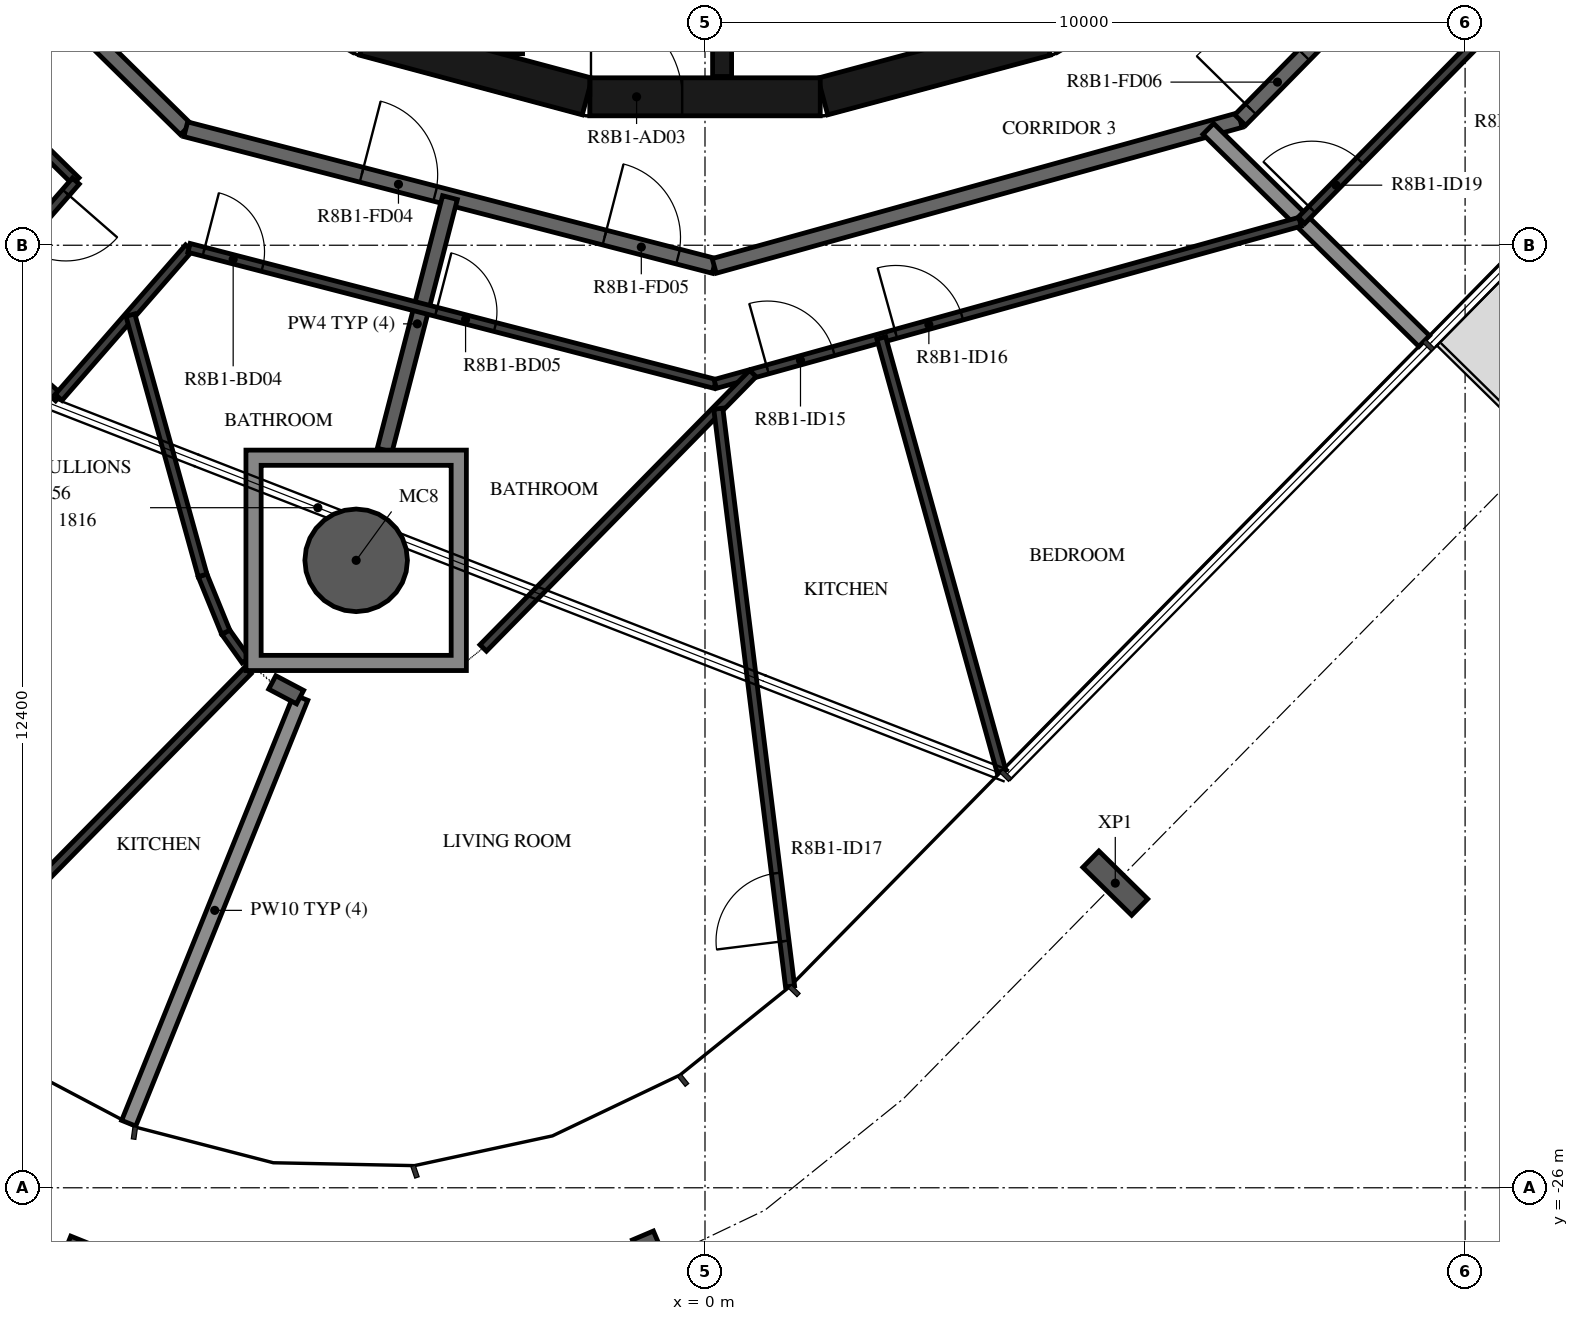
"""IFC4 building model, lengths in metres.
Left out: names, types, materials, properties, quantities, classifications, styles, units other than length and angle.
Written with IfcOpenShell. Run it as: python <this file> out.ifc"""

import sys

from ifc_helpers import new_model, si_unit, direction, frame, frame_2d, origin, origin_2d, place, context, subcontext, project, spatial, polyline, rectangle, hollow_circle, i_section, outline, extrude, element, fill, save


model = new_model("IFC4")
c1 = context("Model", 3, precision=1e-05, world=origin(), true_north=direction((0.0, 1.0)))
c2 = subcontext(c1, "Body", "Model", "MODEL_VIEW")
j1 = project(units=[si_unit("LENGTHUNIT", "METRE"), si_unit("PLANEANGLEUNIT", "RADIAN")], contexts=[c1])
p1 = place(None, origin())
s1 = spatial("IfcSite", under=j1, at=p1, CompositionType="ELEMENT")
p2 = place(p1, origin())
s2 = spatial("IfcBuilding", under=s1, at=p2, CompositionType="ELEMENT")
p3 = place(p2, frame((0.0, 0.0, 308.7)))
s3 = spatial("IfcBuildingStorey", under=s2, at=p3, CompositionType="ELEMENT", Elevation=308.7)
p4 = place(p3, frame((-4.589, -17.745, -0.38), z_axis=(0.0, 0.0, 1.0), x_axis=(1.0, 0.0, 0.0)))
e1 = element("IfcColumn", 1, at=p4, inside=s3, PredefinedType="COLUMN", context=c2, shape_type="SweptSolid", body=[
    extrude(hollow_circle(Radius=0.675, WallThickness=0.03, at=origin_2d()), origin(), (0.0, 0.0, 1.0), 3.5),
])
for number, where, z_axis, x_axis in (
    (2, (-8.373, -27.11, -0.38), (0.0, 0.0, 1.0), (-0.927, 0.375, 0.0)),
    (3, (-0.641, -27.042, -0.38), (0.0, 0.0, 1.0), (-0.92, -0.391, 0.0)),
    (4, (5.398, -21.992, -0.38), (0.0, 0.0, 1.0), (-0.701, -0.713, 0.0)),
):
    element("IfcColumn", number, at=place(p3, frame(where, z_axis=z_axis, x_axis=x_axis)), inside=s3, PredefinedType="COLUMN", context=c2, shape_type="SweptSolid", body=[
        extrude(i_section(OverallWidth=0.3, OverallDepth=0.9, WebThickness=0.019, FlangeThickness=0.035, FilletRadius=0.03, at=origin_2d()), origin(), (0.0, 0.0, 1.0), 3.5),
    ])
for number, where, z_axis, x_axis in (
    (5, (1.55, -11.643, 0.0), (0.0, 0.0, 1.0), (0.966, 0.259, 0.0)),
    (6, (-4.479, -10.858, 0.0), (0.0, 0.0, 1.0), (0.966, -0.259, 0.0)),
):
    element("IfcWall", number, at=place(p3, frame(where, z_axis=z_axis, x_axis=x_axis)), inside=s3, PredefinedType="SHEAR", context=c2, shape_type="SweptSolid", body=[
        extrude(rectangle(XDim=3.033, YDim=0.5, at=frame_2d((1.516, 0.0))), origin(), (0.0, 0.0, 1.0), 3.12),
    ])
p5 = place(p3, frame((-1.516, -11.647, 0.0), z_axis=(0.0, 0.0, 1.0), x_axis=(1.0, 0.0, 0.0)))
e7 = element("IfcWall", 7, at=p5, inside=s3, PredefinedType="SHEAR", context=c2, shape_type="SweptSolid", body=[
    extrude(rectangle(XDim=3.033, YDim=0.5, at=frame_2d((1.516, 0.0))), origin(), (0.0, 0.0, 1.0), 3.12),
])
p6 = place(p5, frame((0.016, 0.0, 0.0)))
e8 = element("IfcOpeningElement", 8, at=p6, cuts=e7, PredefinedType="OPENING", context=c2, shape_type="SweptSolid", body=[
    extrude(rectangle(XDim=1.2, YDim=2.1, at=frame_2d((0.6, 1.05))), frame((0.0, 0.26, 0.0), z_axis=(0.0, -1.0, 0.0), x_axis=(1.0, 0.0, 0.0)), (0.0, 0.0, 1.0), 0.52),
])
p7 = place(p3, frame((-2.525, -8.97, 0.0), z_axis=(0.0, 0.0, 1.0), x_axis=(0.0, -1.0, 0.0)))
e9 = element("IfcWall", 9, at=p7, inside=s3, PredefinedType="SHEAR", context=c2, shape_type="SweptSolid", body=[
    extrude(rectangle(XDim=2.11, YDim=0.25, at=frame_2d((1.055, 0.0))), origin(), (0.0, 0.0, 1.0), 3.12),
])
p8 = place(p3, frame((0.225, -8.97, 0.0), z_axis=(0.0, 0.0, 1.0), x_axis=(0.0, -1.0, 0.0)))
e10 = element("IfcWall", 10, at=p8, inside=s3, PredefinedType="SHEAR", context=c2, shape_type="SweptSolid", body=[
    extrude(rectangle(XDim=2.41, YDim=0.25, at=frame_2d((1.205, 0.0))), origin(), (0.0, 0.0, 1.0), 3.12),
])
p9 = place(p3, frame((-11.953, -7.041, 0.0), z_axis=(0.0, 0.0, 1.0), x_axis=(0.713250549143, -0.70090916255, 0.0)))
e11 = element("IfcWall", 11, at=p9, inside=s3, PredefinedType="STANDARD", context=c2, shape_type="SweptSolid", body=[
    extrude(rectangle(XDim=7.181, YDim=0.2, at=frame_2d((3.59, 0.0))), origin(), (0.0, 0.0, 1.0), 3.12),
])
p10 = place(p3, frame((-6.831, -12.074, 0.0), z_axis=(0.0, 0.0, 1.0), x_axis=(0.968144780225, -0.250391063186, 0.0)))
e12 = element("IfcWall", 12, at=p10, inside=s3, PredefinedType="STANDARD", context=c2, shape_type="SweptSolid", body=[
    extrude(rectangle(XDim=7.181, YDim=0.2, at=frame_2d((3.591, 0.0))), origin(), (0.0, 0.0, 1.0), 3.12),
])
p11 = place(p10, frame((2.39, 0.0, 0.0)))
e13 = element("IfcOpeningElement", 13, at=p11, cuts=e12, PredefinedType="OPENING", context=c2, shape_type="SweptSolid", body=[
    extrude(rectangle(XDim=1.0, YDim=2.1, at=frame_2d((0.5, 1.05))), frame((0.0, 0.11, 0.0), z_axis=(0.0, -1.0, 0.0), x_axis=(1.0, 0.0, 0.0)), (0.0, 0.0, 1.0), 0.22),
])
p12 = place(p10, frame((5.69, 0.0, 0.0)))
e14 = element("IfcOpeningElement", 14, at=p12, cuts=e12, PredefinedType="OPENING", context=c2, shape_type="SweptSolid", body=[
    extrude(rectangle(XDim=1.0, YDim=2.1, at=frame_2d((0.5, 1.05))), frame((0.0, 0.11, 0.0), z_axis=(0.0, -1.0, 0.0), x_axis=(1.0, 0.0, 0.0)), (0.0, 0.0, 1.0), 0.22),
])
p13 = place(p3, frame((0.121, -13.872, 0.0), z_axis=(0.0, 0.0, 1.0), x_axis=(0.963625960674, 0.267254575108, 0.0)))
e15 = element("IfcWall", 15, at=p13, inside=s3, PredefinedType="STANDARD", context=c2, shape_type="SweptSolid", body=[
    extrude(rectangle(XDim=7.181, YDim=0.2, at=frame_2d((3.591, 0.0))), origin(), (0.0, 0.0, 1.0), 3.12),
])
p14 = place(p3, frame((7.041, -11.953, 0.0), z_axis=(0.0, 0.0, 1.0), x_axis=(0.70090916255, 0.713250549143, 0.0)))
e16 = element("IfcWall", 16, at=p14, inside=s3, PredefinedType="STANDARD", context=c2, shape_type="SweptSolid", body=[
    extrude(rectangle(XDim=7.181, YDim=0.2, at=frame_2d((3.59, 0.0))), origin(), (0.0, 0.0, 1.0), 3.12),
])
p15 = place(p14, frame((0.2, 0.0, 0.0)))
e17 = element("IfcOpeningElement", 17, at=p15, cuts=e16, PredefinedType="OPENING", context=c2, shape_type="SweptSolid", body=[
    extrude(rectangle(XDim=1.0, YDim=2.1, at=frame_2d((0.5, 1.05))), frame((0.0, 0.11, 0.0), z_axis=(0.0, -1.0, 0.0), x_axis=(1.0, 0.0, 0.0)), (0.0, 0.0, 1.0), 0.22),
])
p16 = place(p3, frame((-4.214, -16.295, 0.0), z_axis=(0.0, 0.0, 1.0), x_axis=(0.250428810918, 0.968135016752, 0.0)))
e18 = element("IfcWall", 18, at=p16, inside=s3, PredefinedType="STANDARD", context=c2, shape_type="SweptSolid", body=[
    extrude(rectangle(XDim=3.432, YDim=0.2, at=frame_2d((1.716, 0.0))), origin(), (0.0, 0.0, 1.0), 3.12),
])
p17 = place(p3, frame((-7.582, -25.151, 0.0), z_axis=(0.0, 0.0, 1.0), x_axis=(0.3746561435, 0.927163833493, 0.0)))
e19 = element("IfcWall", 19, at=p17, inside=s3, PredefinedType="STANDARD", context=c2, shape_type="SweptSolid", body=[
    extrude(rectangle(XDim=6.041, YDim=0.2, at=frame_2d((3.021, 0.0))), origin(), (0.0, 0.0, 1.0), 2.73),
])
p18 = place(p3, frame((-5.327, -19.545, 0.0), z_axis=(0.0, 0.0, 1.0), x_axis=(-0.884418577045, 0.466694525979, 0.0)))
e20 = element("IfcWall", 20, at=p18, inside=s3, PredefinedType="STANDARD", context=c2, shape_type="SweptSolid", body=[
    extrude(rectangle(XDim=0.414, YDim=0.2, at=frame_2d((0.207, 0.0))), origin(), (0.0, 0.0, 1.0), 3.12),
])
p19 = place(p3, frame((9.462, -14.861, 0.0), z_axis=(0.0, 0.0, 1.0), x_axis=(-0.713302018318, 0.700856783276, 0.0)))
e21 = element("IfcWall", 21, at=p19, inside=s3, PredefinedType="STANDARD", context=c2, shape_type="SweptSolid", body=[
    extrude(rectangle(XDim=3.982, YDim=0.2, at=frame_2d((1.991, 0.0))), origin(), (0.0, 0.0, 1.0), 2.73),
])
p20 = place(p3, frame((-13.291, -7.829, 0.0), z_axis=(0.0, 0.0, 1.0), x_axis=(0.71326209988, -0.700897408238, 0.0)))
e22 = element("IfcWall", 22, at=p20, inside=s3, PredefinedType="PARTITIONING", context=c2, shape_type="SweptSolid", body=[
    extrude(rectangle(XDim=7.029, YDim=0.12, at=frame_2d((3.515, 0.0))), origin(), (0.0, 0.0, 1.0), 3.12),
])
p21 = place(p3, frame((-8.278, -12.756, 0.0), z_axis=(0.0, 0.0, 1.0), x_axis=(-0.657358463875, -0.753578031774, 0.0)))
e23 = element("IfcWall", 23, at=p21, inside=s3, PredefinedType="PARTITIONING", context=c2, shape_type="SweptSolid", body=[
    extrude(rectangle(XDim=2.294, YDim=0.12, at=frame_2d((1.147, 0.0))), origin(), (0.0, 0.0, 1.0), 3.12),
])
p22 = place(p21, frame((0.2, 0.0, 0.0)))
e24 = element("IfcOpeningElement", 24, at=p22, cuts=e23, PredefinedType="OPENING", context=c2, shape_type="SweptSolid", body=[
    extrude(rectangle(XDim=0.9, YDim=2.1, at=frame_2d((0.45, 1.05))), frame((0.0, 0.07, 0.0), z_axis=(0.0, -1.0, 0.0), x_axis=(1.0, 0.0, 0.0)), (0.0, 0.0, 1.0), 0.14),
])
p23 = place(p3, frame((-9.785, -14.484, 0.0), z_axis=(0.0, 0.0, 1.0), x_axis=(0.753643217927, -0.657283728745, 0.0)))
e25 = element("IfcWall", 25, at=p23, inside=s3, PredefinedType="PARTITIONING", context=c2, shape_type="SweptSolid", body=[
    extrude(rectangle(XDim=1.7, YDim=0.12, at=frame_2d((0.85, 0.0))), origin(), (0.0, 0.0, 1.0), 3.12),
])
p24 = place(p3, frame((-8.504, -15.602, 0.0), z_axis=(0.0, 0.0, 1.0), x_axis=(0.657298689015, 0.753630170189, 0.0)))
e26 = element("IfcWall", 26, at=p24, inside=s3, PredefinedType="PARTITIONING", context=c2, shape_type="SweptSolid", body=[
    extrude(rectangle(XDim=2.61, YDim=0.12, at=frame_2d((1.305, 0.0))), origin(), (0.0, 0.0, 1.0), 3.12),
])
p25 = place(p3, frame((-6.788, -13.635, 0.0), z_axis=(0.0, 0.0, 1.0), x_axis=(0.968142345176, -0.250400478189, 0.0)))
e27 = element("IfcWall", 27, at=p25, inside=s3, PredefinedType="PARTITIONING", context=c2, shape_type="SweptSolid", body=[
    extrude(rectangle(XDim=7.151, YDim=0.12, at=frame_2d((3.575, 0.0))), origin(), (0.0, 0.0, 1.0), 3.12),
])
p26 = place(p25, frame((0.2, 0.0, 0.0)))
e28 = element("IfcOpeningElement", 28, at=p26, cuts=e27, PredefinedType="OPENING", context=c2, shape_type="SweptSolid", body=[
    extrude(rectangle(XDim=0.8, YDim=2.1, at=frame_2d((0.4, 1.05))), frame((0.0, 0.07, 0.0), z_axis=(0.0, -1.0, 0.0), x_axis=(1.0, 0.0, 0.0)), (0.0, 0.0, 1.0), 0.14),
])
p27 = place(p25, frame((3.358, 0.0, 0.0)))
e29 = element("IfcOpeningElement", 29, at=p27, cuts=e27, PredefinedType="OPENING", context=c2, shape_type="SweptSolid", body=[
    extrude(rectangle(XDim=0.8, YDim=2.1, at=frame_2d((0.4, 1.05))), frame((0.0, 0.07, 0.0), z_axis=(0.0, -1.0, 0.0), x_axis=(1.0, 0.0, 0.0)), (0.0, 0.0, 1.0), 0.14),
])
p28 = place(p3, frame((-6.042, -19.061, 0.0), z_axis=(0.0, 0.0, 1.0), x_axis=(-0.580679627377, 0.814132157791, 0.0)))
e30 = element("IfcWall", 30, at=p28, inside=s3, PredefinedType="PARTITIONING", context=c2, shape_type="SweptSolid", body=[
    extrude(rectangle(XDim=0.455, YDim=0.12, at=frame_2d((0.228, 0.0))), origin(), (0.0, 0.0, 1.0), 3.12),
])
p29 = place(p3, frame((-6.306, -18.69, 0.0), z_axis=(0.0, 0.0, 1.0), x_axis=(-0.377123826076, 0.926162847347, 0.0)))
e31 = element("IfcWall", 31, at=p29, inside=s3, PredefinedType="PARTITIONING", context=c2, shape_type="SweptSolid", body=[
    extrude(rectangle(XDim=0.807, YDim=0.12, at=frame_2d((0.403, 0.0))), origin(), (0.0, 0.0, 1.0), 3.12),
])
p30 = place(p3, frame((-6.61, -17.943, 0.0), z_axis=(0.0, 0.0, 1.0), x_axis=(-0.267254066434, 0.96362610175, 0.0)))
e32 = element("IfcWall", 32, at=p30, inside=s3, PredefinedType="PARTITIONING", context=c2, shape_type="SweptSolid", body=[
    extrude(rectangle(XDim=3.553, YDim=0.12, at=frame_2d((1.777, 0.0))), origin(), (0.0, 0.0, 1.0), 3.12),
])
p31 = place(p3, frame((-10.169, -23.421, 0.0), z_axis=(0.0, 0.0, 1.0), x_axis=(0.70104569517, 0.713116353258, 0.0)))
e33 = element("IfcWall", 33, at=p31, inside=s3, PredefinedType="PARTITIONING", context=c2, shape_type="SweptSolid", body=[
    extrude(rectangle(XDim=5.926, YDim=0.12, at=frame_2d((2.963, 0.0))), origin(), (0.0, 0.0, 1.0), 3.12),
])
p32 = place(p31, frame((0.2, 0.0, 0.0)))
e34 = element("IfcOpeningElement", 34, at=p32, cuts=e33, PredefinedType="OPENING", context=c2, shape_type="SweptSolid", body=[
    extrude(rectangle(XDim=0.9, YDim=2.1, at=frame_2d((0.45, 1.05))), frame((0.0, 0.07, 0.0), z_axis=(0.0, -1.0, 0.0), x_axis=(1.0, 0.0, 0.0)), (0.0, 0.0, 1.0), 0.14),
])
p33 = place(p3, frame((0.135, -15.425, 0.0), z_axis=(0.0, 0.0, 1.0), x_axis=(0.963633899075, 0.267225950373, 0.0)))
e35 = element("IfcWall", 35, at=p33, inside=s3, PredefinedType="PARTITIONING", context=c2, shape_type="SweptSolid", body=[
    extrude(rectangle(XDim=7.985, YDim=0.12, at=frame_2d((3.992, 0.0))), origin(), (0.0, 0.0, 1.0), 3.12),
])
p34 = place(p33, frame((0.714, 0.0, 0.0)))
e36 = element("IfcOpeningElement", 36, at=p34, cuts=e35, PredefinedType="OPENING", context=c2, shape_type="SweptSolid", body=[
    extrude(rectangle(XDim=0.9, YDim=2.1, at=frame_2d((0.45, 1.05))), frame((0.0, 0.07, 0.0), z_axis=(0.0, -1.0, 0.0), x_axis=(1.0, 0.0, 0.0)), (0.0, 0.0, 1.0), 0.14),
])
p35 = place(p33, frame((2.467, 0.0, 0.0)))
e37 = element("IfcOpeningElement", 37, at=p35, cuts=e35, PredefinedType="OPENING", context=c2, shape_type="SweptSolid", body=[
    extrude(rectangle(XDim=0.9, YDim=2.1, at=frame_2d((0.45, 1.05))), frame((0.0, 0.07, 0.0), z_axis=(0.0, -1.0, 0.0), x_axis=(1.0, 0.0, 0.0)), (0.0, 0.0, 1.0), 0.14),
])
p36 = place(p3, frame((-2.918, -18.898, 0.0), z_axis=(0.0, 0.0, 1.0), x_axis=(0.700881606707, 0.713277627141, 0.0)))
e38 = element("IfcWall", 38, at=p36, inside=s3, PredefinedType="PARTITIONING", context=c2, shape_type="SweptSolid", body=[
    extrude(rectangle(XDim=5.062, YDim=0.12, at=frame_2d((2.531, 0.0))), origin(), (0.0, 0.0, 1.0), 3.12),
])
p37 = place(p3, frame((1.119, -23.35, 0.0), z_axis=(0.0, 0.0, 1.0), x_axis=(-0.123281341476, 0.992371760402, 0.0)))
e39 = element("IfcWall", 39, at=p37, inside=s3, PredefinedType="PARTITIONING", context=c2, shape_type="SweptSolid", body=[
    extrude(rectangle(XDim=7.658, YDim=0.12, at=frame_2d((3.829, 0.0))), origin(), (0.0, 0.0, 1.0), 3.12),
])
p38 = place(p37, frame((0.6, 0.0, 0.0)))
e40 = element("IfcOpeningElement", 40, at=p38, cuts=e39, PredefinedType="OPENING", context=c2, shape_type="SweptSolid", body=[
    extrude(rectangle(XDim=0.9, YDim=2.1, at=frame_2d((0.45, 1.05))), frame((0.0, 0.07, 0.0), z_axis=(0.0, -1.0, 0.0), x_axis=(1.0, 0.0, 0.0)), (0.0, 0.0, 1.0), 0.14),
])
p39 = place(p3, frame((3.9, -20.521, 0.0), z_axis=(0.0, 0.0, 1.0), x_axis=(-0.267235205115, 0.963631332589, 0.0)))
e41 = element("IfcWall", 41, at=p39, inside=s3, PredefinedType="PARTITIONING", context=c2, shape_type="SweptSolid", body=[
    extrude(rectangle(XDim=5.916, YDim=0.12, at=frame_2d((2.958, 0.0))), origin(), (0.0, 0.0, 1.0), 3.12),
])
p40 = place(p3, frame((7.846, -13.273, 0.0), z_axis=(0.0, 0.0, 1.0), x_axis=(0.700915117659, 0.713244697027, 0.0)))
e42 = element("IfcWall", 42, at=p40, inside=s3, PredefinedType="PARTITIONING", context=c2, shape_type="SweptSolid", body=[
    extrude(rectangle(XDim=7.96, YDim=0.12, at=frame_2d((3.98, 0.0))), origin(), (0.0, 0.0, 1.0), 3.12),
])
p41 = place(p40, frame((0.2, 0.0, 0.0)))
e43 = element("IfcOpeningElement", 43, at=p41, cuts=e42, PredefinedType="OPENING", context=c2, shape_type="SweptSolid", body=[
    extrude(rectangle(XDim=0.9, YDim=2.1, at=frame_2d((0.45, 1.05))), frame((0.0, 0.07, 0.0), z_axis=(0.0, -1.0, 0.0), x_axis=(1.0, 0.0, 0.0)), (0.0, 0.0, 1.0), 0.14),
])
p42 = place(p3, origin())
e44 = element("IfcWall", 44, at=p42, inside=s3, PredefinedType="STANDARD", context=c2, shape_type="SweptSolid", body=[
    extrude(outline(polyline([(-3.139, -16.295), (-3.139, -19.195), (-6.039, -19.195), (-6.039, -16.295), (-3.139, -16.295)]), holes=[polyline([(-5.839, -18.995), (-3.339, -18.995), (-3.339, -16.495), (-5.839, -16.495), (-5.839, -18.995)])]), origin(), (0.0, 0.0, 1.0), 3.12),
])
p43 = place(p6, origin())
e45 = element("IfcDoor", 45, at=p43, inside=s3, OperationType="SINGLE_SWING_RIGHT", PredefinedType="DOOR", context=c2, shape_type="SweptSolid", body=[
    extrude(rectangle(XDim=1.2, YDim=2.1, at=frame_2d((0.6, 1.05))), frame((0.0, 0.025, 0.0), z_axis=(0.0, -1.0, 0.0), x_axis=(1.0, 0.0, 0.0)), (0.0, 0.0, 1.0), 0.05),
])
fill(e8, e45)
p44 = place(p11, origin())
e46 = element("IfcDoor", 46, at=p44, inside=s3, OperationType="SINGLE_SWING_RIGHT", PredefinedType="DOOR", context=c2, shape_type="SweptSolid", body=[
    extrude(rectangle(XDim=1.0, YDim=2.1, at=frame_2d((0.5, 1.05))), frame((0.0, 0.025, 0.0), z_axis=(0.0, -1.0, 0.0), x_axis=(1.0, 0.0, 0.0)), (0.0, 0.0, 1.0), 0.05),
])
fill(e13, e46)
p45 = place(p22, origin())
e47 = element("IfcDoor", 47, at=p45, inside=s3, OperationType="SINGLE_SWING_RIGHT", PredefinedType="DOOR", context=c2, shape_type="SweptSolid", body=[
    extrude(rectangle(XDim=0.9, YDim=2.1, at=frame_2d((0.45, 1.05))), frame((0.0, 0.025, 0.0), z_axis=(0.0, -1.0, 0.0), x_axis=(1.0, 0.0, 0.0)), (0.0, 0.0, 1.0), 0.05),
])
fill(e24, e47)
p46 = place(p26, origin())
e48 = element("IfcDoor", 48, at=p46, inside=s3, OperationType="SINGLE_SWING_RIGHT", PredefinedType="DOOR", context=c2, shape_type="SweptSolid", body=[
    extrude(rectangle(XDim=0.8, YDim=2.1, at=frame_2d((0.4, 1.05))), frame((0.0, 0.025, 0.0), z_axis=(0.0, -1.0, 0.0), x_axis=(1.0, 0.0, 0.0)), (0.0, 0.0, 1.0), 0.05),
])
fill(e28, e48)
p47 = place(p12, origin())
e49 = element("IfcDoor", 49, at=p47, inside=s3, OperationType="SINGLE_SWING_LEFT", PredefinedType="DOOR", context=c2, shape_type="SweptSolid", body=[
    extrude(rectangle(XDim=1.0, YDim=2.1, at=frame_2d((0.5, 1.05))), frame((0.0, 0.025, 0.0), z_axis=(0.0, -1.0, 0.0), x_axis=(1.0, 0.0, 0.0)), (0.0, 0.0, 1.0), 0.05),
])
fill(e14, e49)
p48 = place(p27, origin())
e50 = element("IfcDoor", 50, at=p48, inside=s3, OperationType="SINGLE_SWING_RIGHT", PredefinedType="DOOR", context=c2, shape_type="SweptSolid", body=[
    extrude(rectangle(XDim=0.8, YDim=2.1, at=frame_2d((0.4, 1.05))), frame((0.0, 0.025, 0.0), z_axis=(0.0, -1.0, 0.0), x_axis=(1.0, 0.0, 0.0)), (0.0, 0.0, 1.0), 0.05),
])
fill(e29, e50)
p49 = place(p34, origin())
e51 = element("IfcDoor", 51, at=p49, inside=s3, OperationType="SINGLE_SWING_LEFT", PredefinedType="DOOR", context=c2, shape_type="SweptSolid", body=[
    extrude(rectangle(XDim=0.9, YDim=2.1, at=frame_2d((0.45, 1.05))), frame((0.0, 0.025, 0.0), z_axis=(0.0, -1.0, 0.0), x_axis=(1.0, 0.0, 0.0)), (0.0, 0.0, 1.0), 0.05),
])
fill(e36, e51)
p50 = place(p35, origin())
e52 = element("IfcDoor", 52, at=p50, inside=s3, OperationType="SINGLE_SWING_LEFT", PredefinedType="DOOR", context=c2, shape_type="SweptSolid", body=[
    extrude(rectangle(XDim=0.9, YDim=2.1, at=frame_2d((0.45, 1.05))), frame((0.0, 0.025, 0.0), z_axis=(0.0, -1.0, 0.0), x_axis=(1.0, 0.0, 0.0)), (0.0, 0.0, 1.0), 0.05),
])
fill(e37, e52)
p51 = place(p38, origin())
e53 = element("IfcDoor", 53, at=p51, inside=s3, OperationType="SINGLE_SWING_LEFT", PredefinedType="DOOR", context=c2, shape_type="SweptSolid", body=[
    extrude(rectangle(XDim=0.9, YDim=2.1, at=frame_2d((0.45, 1.05))), frame((0.0, 0.025, 0.0), z_axis=(0.0, -1.0, 0.0), x_axis=(1.0, 0.0, 0.0)), (0.0, 0.0, 1.0), 0.05),
])
fill(e40, e53)
p52 = place(p15, origin())
e54 = element("IfcDoor", 54, at=p52, inside=s3, OperationType="SINGLE_SWING_LEFT", PredefinedType="DOOR", context=c2, shape_type="SweptSolid", body=[
    extrude(rectangle(XDim=1.0, YDim=2.1, at=frame_2d((0.5, 1.05))), frame((0.0, 0.025, 0.0), z_axis=(0.0, -1.0, 0.0), x_axis=(1.0, 0.0, 0.0)), (0.0, 0.0, 1.0), 0.05),
])
fill(e17, e54)
p53 = place(p41, origin())
e55 = element("IfcDoor", 55, at=p53, inside=s3, OperationType="SINGLE_SWING_LEFT", PredefinedType="DOOR", context=c2, shape_type="SweptSolid", body=[
    extrude(rectangle(XDim=0.9, YDim=2.1, at=frame_2d((0.45, 1.05))), frame((0.0, 0.025, 0.0), z_axis=(0.0, -1.0, 0.0), x_axis=(1.0, 0.0, 0.0)), (0.0, 0.0, 1.0), 0.05),
])
fill(e43, e55)
save(model, sys.argv[1])
